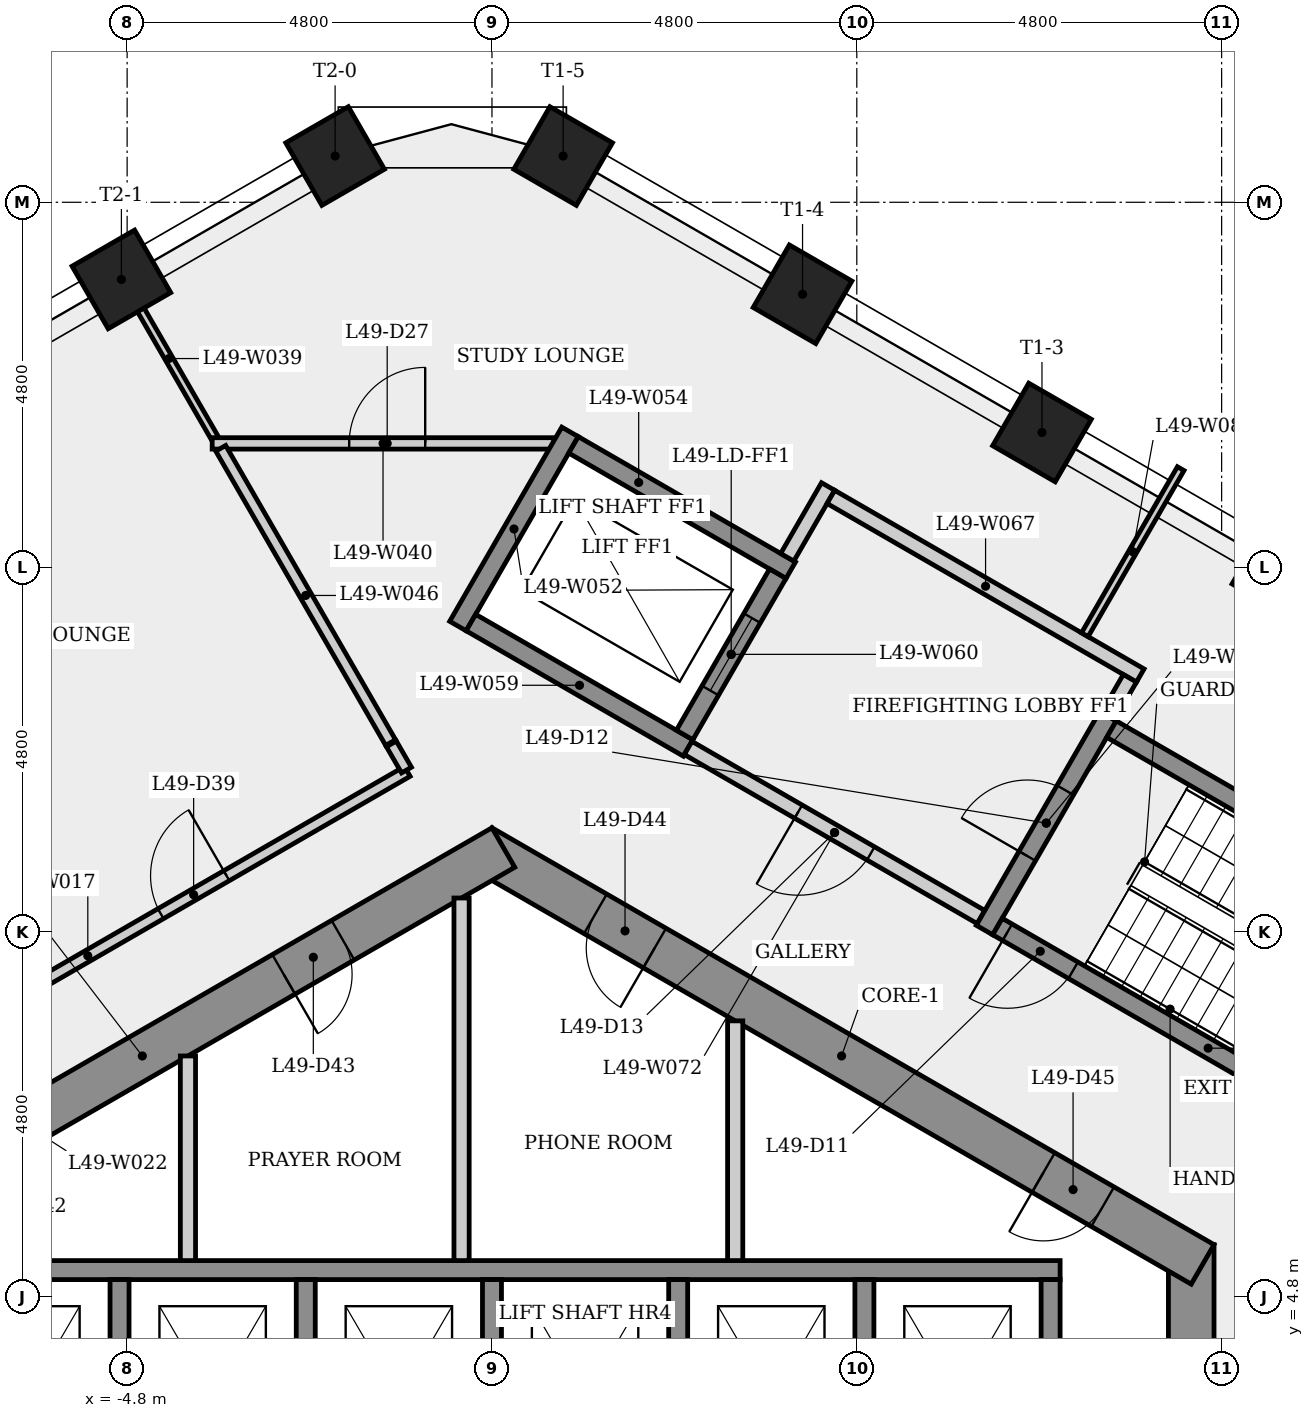
"""IFC4 building model, lengths in metres.
Left out: names, types, materials, properties, quantities, classifications, styles, units other than length and angle.
Written with IfcOpenShell. Run it as: python <this file> out.ifc"""

import sys

from ifc_helpers import new_model, si_unit, direction, frame, frame_2d, origin, origin_2d, place, context, subcontext, project, spatial, rectangle, extrude, element, fill, save


model = new_model("IFC4")
c1 = context("Model", 3, precision=1e-05, world=origin(), true_north=direction((0.0, 1.0)))
c2 = subcontext(c1, "Body", "Model", "MODEL_VIEW")
j1 = project(units=[si_unit("LENGTHUNIT", "METRE"), si_unit("PLANEANGLEUNIT", "RADIAN")], contexts=[c1])
p1 = place(None, origin())
s1 = spatial("IfcSite", under=j1, at=p1, CompositionType="ELEMENT")
p2 = place(p1, origin())
s2 = spatial("IfcBuilding", under=s1, at=p2, CompositionType="ELEMENT")
p3 = place(p2, frame((0.0, 0.0, 183.3)))
s3 = spatial("IfcBuildingStorey", under=s2, at=p3, CompositionType="ELEMENT", Elevation=183.3)
p4 = place(p3, frame((9.2, -5.485, 0.0), z_axis=(0.0, 0.0, 1.0), x_axis=(0.0, 1.0, 0.0)))
e1 = element("IfcWall", 1, at=p4, inside=s3, PredefinedType="SHEAR", context=c2, shape_type="SweptSolid", body=[
    extrude(rectangle(XDim=10.97, YDim=0.6, at=frame_2d((5.485, 0.0))), origin(), (0.0, 0.0, 1.0), 3.4),
])
p5 = place(p4, frame((4.685, 0.0, 0.0)))
e2 = element("IfcOpeningElement", 2, at=p5, cuts=e1, PredefinedType="OPENING", context=c2, shape_type="SweptSolid", body=[
    extrude(rectangle(XDim=1.6, YDim=2.1, at=frame_2d((0.8, 1.05))), frame((0.0, 0.31, 0.0), z_axis=(0.0, -1.0, 0.0), x_axis=(1.0, 0.0, 0.0)), (0.0, 0.0, 1.0), 0.62),
])
p6 = place(p3, frame((9.35, 5.225, 0.0), z_axis=(0.0, 0.0, 1.0), x_axis=(-0.866023993627, 0.500002442456, 0.0)))
e3 = element("IfcWall", 3, at=p6, inside=s3, PredefinedType="SHEAR", context=c2, shape_type="SweptSolid", body=[
    extrude(rectangle(XDim=10.97, YDim=0.6, at=frame_2d((5.485, 0.0))), origin(), (0.0, 0.0, 1.0), 3.4),
])
p7 = place(p6, frame((8.325, 0.0, 0.0)))
e4 = element("IfcOpeningElement", 4, at=p7, cuts=e3, PredefinedType="OPENING", context=c2, shape_type="SweptSolid", body=[
    extrude(rectangle(XDim=0.9, YDim=2.1, at=frame_2d((0.45, 1.05))), frame((0.0, 0.31, 0.0), z_axis=(0.0, -1.0, 0.0), x_axis=(1.0, 0.0, 0.0)), (0.0, 0.0, 1.0), 0.62),
])
p8 = place(p6, frame((1.518, 0.0, 0.0)))
e5 = element("IfcOpeningElement", 5, at=p8, cuts=e3, PredefinedType="OPENING", context=c2, shape_type="SweptSolid", body=[
    extrude(rectangle(XDim=0.9, YDim=2.1, at=frame_2d((0.45, 1.05))), frame((0.0, 0.31, 0.0), z_axis=(0.0, -1.0, 0.0), x_axis=(1.0, 0.0, 0.0)), (0.0, 0.0, 1.0), 0.62),
])
p9 = place(p3, frame((0.15, 10.71, 0.0), z_axis=(0.0, 0.0, 1.0), x_axis=(-0.866023993627, -0.500002442456, 0.0)))
e6 = element("IfcWall", 6, at=p9, inside=s3, PredefinedType="SHEAR", context=c2, shape_type="SweptSolid", body=[
    extrude(rectangle(XDim=10.97, YDim=0.6, at=frame_2d((5.485, 0.0))), origin(), (0.0, 0.0, 1.0), 3.4),
])
p10 = place(p9, frame((9.013, 0.0, 0.0)))
e7 = element("IfcOpeningElement", 7, at=p10, cuts=e6, PredefinedType="OPENING", context=c2, shape_type="SweptSolid", body=[
    extrude(rectangle(XDim=0.9, YDim=2.1, at=frame_2d((0.45, 1.05))), frame((0.0, 0.31, 0.0), z_axis=(0.0, -1.0, 0.0), x_axis=(1.0, 0.0, 0.0)), (0.0, 0.0, 1.0), 0.62),
])
p11 = place(p9, frame((2.437, 0.0, 0.0)))
e8 = element("IfcOpeningElement", 8, at=p11, cuts=e6, PredefinedType="OPENING", context=c2, shape_type="SweptSolid", body=[
    extrude(rectangle(XDim=0.9, YDim=2.1, at=frame_2d((0.45, 1.05))), frame((0.0, 0.31, 0.0), z_axis=(0.0, -1.0, 0.0), x_axis=(1.0, 0.0, 0.0)), (0.0, 0.0, 1.0), 0.62),
])
for number, where, z_axis, x_axis in (
    (9, (10.386, 14.352, 0.0), (0.0, 0.0, 1.0), (0.5, 0.866, 0.0)),
    (10, (7.236, 16.171, 0.0), (0.0, 0.0, 1.0), (0.5, 0.866, 0.0)),
    (11, (4.086, 17.99, 0.0), (0.0, 0.0, 1.0), (0.5, 0.866, 0.0)),
    (12, (0.936, 19.808, 0.0), (0.0, 0.0, 1.0), (0.5, 0.866, 0.0)),
    (13, (-2.064, 19.808, 0.0), (0.0, 0.0, 1.0), (-0.5, 0.866, 0.0)),
    (14, (-4.875, 18.185, 0.0), (0.0, 0.0, 1.0), (-0.5, 0.866, 0.0)),
):
    element("IfcColumn", number, at=place(p3, frame(where, z_axis=z_axis, x_axis=x_axis)), inside=s3, PredefinedType="COLUMN", context=c2, shape_type="SweptSolid", body=[
        extrude(rectangle(XDim=0.95, YDim=0.95, at=origin_2d()), origin(), (0.0, 0.0, 1.0), 3.4),
    ])
p12 = place(p3, frame((-9.521, 6.859, 0.0), z_axis=(0.0, 0.0, 1.0), x_axis=(0.866022649559, 0.500004770428, 0.0)))
e15 = element("IfcWall", 15, at=p12, inside=s3, PredefinedType="PARTITIONING", context=c2, shape_type="SweptSolid", body=[
    extrude(rectangle(XDim=9.707, YDim=0.15, at=frame_2d((4.853, 0.0))), origin(), (0.0, 0.0, 1.0), 3.0),
])
p13 = place(p12, frame((5.961, 0.0, 0.0)))
e16 = element("IfcOpeningElement", 16, at=p13, cuts=e15, PredefinedType="OPENING", context=c2, shape_type="SweptSolid", body=[
    extrude(rectangle(XDim=1.0, YDim=2.1, at=frame_2d((0.5, 1.05))), frame((0.0, 0.085, 0.0), z_axis=(0.0, -1.0, 0.0), x_axis=(1.0, 0.0, 0.0)), (0.0, 0.0, 1.0), 0.17),
])
p14 = place(p3, frame((-7.225, 5.15, 0.0), z_axis=(0.0, 0.0, 1.0), x_axis=(1.0, 0.0, 0.0)))
e17 = element("IfcWall", 17, at=p14, inside=s3, PredefinedType="SHEAR", context=c2, shape_type="SweptSolid", body=[
    extrude(rectangle(XDim=14.7, YDim=0.25, at=frame_2d((7.35, 0.0))), origin(), (0.0, 0.0, 1.0), 3.0),
])
p15 = place(p3, frame((-4.9, 5.025, 0.0), z_axis=(0.0, 0.0, 1.0), x_axis=(0.0, -1.0, 0.0)))
e18 = element("IfcWall", 18, at=p15, inside=s3, PredefinedType="SHEAR", context=c2, shape_type="SweptSolid", body=[
    extrude(rectangle(XDim=3.1, YDim=0.25, at=frame_2d((1.55, 0.0))), origin(), (0.0, 0.0, 1.0), 3.4),
])
p16 = place(p3, frame((-4.0, 7.967, 0.0), z_axis=(0.0, 0.0, 1.0), x_axis=(0.0, -1.0, 0.0)))
e19 = element("IfcWall", 19, at=p16, inside=s3, PredefinedType="PARTITIONING", context=c2, shape_type="SweptSolid", body=[
    extrude(rectangle(XDim=2.692, YDim=0.2, at=frame_2d((1.346, 0.0))), origin(), (0.0, 0.0, 1.0), 3.0),
])
p17 = place(p3, frame((-3.644, 16.093, 0.0), z_axis=(0.0, 0.0, 1.0), x_axis=(-0.500021275498, 0.866013120021, 0.0)))
e20 = element("IfcWall", 20, at=p17, inside=s3, PredefinedType="PARTITIONING", context=c2, shape_type="SweptSolid", body=[
    extrude(rectangle(XDim=2.428, YDim=0.1, at=frame_2d((1.214, 0.0))), origin(), (0.0, 0.0, 1.0), 3.0),
])
p18 = place(p3, frame((-3.681, 16.028, 0.0), z_axis=(0.0, 0.0, 1.0), x_axis=(1.0, 0.0, 0.0)))
e21 = element("IfcWall", 21, at=p18, inside=s3, PredefinedType="PARTITIONING", context=c2, shape_type="SweptSolid", body=[
    extrude(rectangle(XDim=4.496, YDim=0.15, at=frame_2d((2.248, 0.0))), origin(), (0.0, 0.0, 1.0), 3.0),
])
p19 = place(p18, frame((1.803, 0.0, 0.0)))
e22 = element("IfcOpeningElement", 22, at=p19, cuts=e21, PredefinedType="OPENING", context=c2, shape_type="SweptSolid", body=[
    extrude(rectangle(XDim=1.0, YDim=2.1, at=frame_2d((0.5, 1.05))), frame((0.0, 0.085, 0.0), z_axis=(0.0, -1.0, 0.0), x_axis=(1.0, 0.0, 0.0)), (0.0, 0.0, 1.0), 0.17),
])
p20 = place(p3, frame((-2.45, 5.025, 0.0), z_axis=(0.0, 0.0, 1.0), x_axis=(0.0, -1.0, 0.0)))
e23 = element("IfcWall", 23, at=p20, inside=s3, PredefinedType="SHEAR", context=c2, shape_type="SweptSolid", body=[
    extrude(rectangle(XDim=3.1, YDim=0.25, at=frame_2d((1.55, 0.0))), origin(), (0.0, 0.0, 1.0), 3.4),
])
p21 = place(p3, frame((-1.333, 12.091, 0.0), z_axis=(0.0, 0.0, 1.0), x_axis=(-0.499991893987, 0.866030083742, 0.0)))
e24 = element("IfcWall", 24, at=p21, inside=s3, PredefinedType="PARTITIONING", context=c2, shape_type="SweptSolid", body=[
    extrude(rectangle(XDim=4.471, YDim=0.15, at=frame_2d((2.235, 0.0))), origin(), (0.0, 0.0, 1.0), 3.0),
])
p22 = place(p3, frame((-1.323, 12.073, 0.0), z_axis=(0.0, 0.0, 1.0), x_axis=(0.4999705729, -0.866042392862, 0.0)))
e25 = element("IfcWall", 25, at=p22, inside=s3, PredefinedType="PARTITIONING", context=c2, shape_type="SweptSolid", body=[
    extrude(rectangle(XDim=0.397, YDim=0.15, at=frame_2d((0.199, 0.0))), origin(), (0.0, 0.0, 1.0), 3.0),
])
p23 = place(p3, frame((-0.4, 10.046, 0.0), z_axis=(0.0, 0.0, 1.0), x_axis=(0.0, -1.0, 0.0)))
e26 = element("IfcWall", 26, at=p23, inside=s3, PredefinedType="PARTITIONING", context=c2, shape_type="SweptSolid", body=[
    extrude(rectangle(XDim=4.771, YDim=0.2, at=frame_2d((2.385, 0.0))), origin(), (0.0, 0.0, 1.0), 3.0),
])
p24 = place(p3, frame((-0.448, 13.624, 0.0), z_axis=(0.0, 0.0, 1.0), x_axis=(0.500037662692, 0.866003658127, 0.0)))
e27 = element("IfcWall", 27, at=p24, inside=s3, PredefinedType="SHEAR", context=c2, shape_type="SweptSolid", body=[
    extrude(rectangle(XDim=2.95, YDim=0.25, at=frame_2d((1.475, 0.0))), origin(), (0.0, 0.0, 1.0), 3.0),
])
p25 = place(p3, frame((0.0, 5.025, 0.0), z_axis=(0.0, 0.0, 1.0), x_axis=(0.0, -1.0, 0.0)))
e28 = element("IfcWall", 28, at=p25, inside=s3, PredefinedType="SHEAR", context=c2, shape_type="SweptSolid", body=[
    extrude(rectangle(XDim=3.1, YDim=0.25, at=frame_2d((1.55, 0.0))), origin(), (0.0, 0.0, 1.0), 3.4),
])
p26 = place(p3, frame((1.073, 16.008, 0.0), z_axis=(0.0, 0.0, 1.0), x_axis=(0.866040211805, -0.499974350878, 0.0)))
e29 = element("IfcWall", 29, at=p26, inside=s3, PredefinedType="SHEAR", context=c2, shape_type="SweptSolid", body=[
    extrude(rectangle(XDim=3.3, YDim=0.25, at=frame_2d((1.65, 0.0))), origin(), (0.0, 0.0, 1.0), 3.0),
])
p27 = place(p3, frame((2.45, 5.025, 0.0), z_axis=(0.0, 0.0, 1.0), x_axis=(0.0, -1.0, 0.0)))
e30 = element("IfcWall", 30, at=p27, inside=s3, PredefinedType="SHEAR", context=c2, shape_type="SweptSolid", body=[
    extrude(rectangle(XDim=3.1, YDim=0.25, at=frame_2d((1.55, 0.0))), origin(), (0.0, 0.0, 1.0), 3.4),
])
p28 = place(p3, frame((2.581, 12.02, 0.0), z_axis=(0.0, 0.0, 1.0), x_axis=(-0.866040211805, 0.499974350878, 0.0)))
e31 = element("IfcWall", 31, at=p28, inside=s3, PredefinedType="SHEAR", context=c2, shape_type="SweptSolid", body=[
    extrude(rectangle(XDim=3.3, YDim=0.25, at=frame_2d((1.65, 0.0))), origin(), (0.0, 0.0, 1.0), 3.0),
])
p29 = place(p3, frame((2.535, 12.191, 0.0), z_axis=(0.0, 0.0, 1.0), x_axis=(0.500061746146, 0.865989751695, 0.0)))
e32 = element("IfcWall", 32, at=p29, inside=s3, PredefinedType="SHEAR", context=c2, shape_type="SweptSolid", body=[
    extrude(rectangle(XDim=2.45, YDim=0.25, at=frame_2d((1.225, 0.0))), origin(), (0.0, 0.0, 1.0), 3.4),
])
p30 = place(p29, frame((0.675, 0.0, 0.0)))
e33 = element("IfcOpeningElement", 33, at=p30, cuts=e32, PredefinedType="OPENING", context=c2, shape_type="SweptSolid", body=[
    extrude(rectangle(XDim=1.1, YDim=2.1, at=frame_2d((0.55, 1.05))), frame((0.0, 0.135, 0.0), z_axis=(0.0, -1.0, 0.0), x_axis=(1.0, 0.0, 0.0)), (0.0, 0.0, 1.0), 0.27),
])
p31 = place(p3, frame((3.2, 8.429, 0.0), z_axis=(0.0, 0.0, 1.0), x_axis=(0.0, -1.0, 0.0)))
e34 = element("IfcWall", 34, at=p31, inside=s3, PredefinedType="PARTITIONING", context=c2, shape_type="SweptSolid", body=[
    extrude(rectangle(XDim=3.154, YDim=0.2, at=frame_2d((1.577, 0.0))), origin(), (0.0, 0.0, 1.0), 3.0),
])
p32 = place(p3, frame((3.885, 14.529, 0.0), z_axis=(0.0, 0.0, 1.0), x_axis=(0.499997628298, 0.866026773083, 0.0)))
e35 = element("IfcWall", 35, at=p32, inside=s3, PredefinedType="PARTITIONING", context=c2, shape_type="SweptSolid", body=[
    extrude(rectangle(XDim=1.075, YDim=0.2, at=frame_2d((0.538, 0.0))), origin(), (0.0, 0.0, 1.0), 3.0),
])
p33 = place(p3, frame((4.459, 15.323, 0.0), z_axis=(0.0, 0.0, 1.0), x_axis=(0.866016039709, -0.500016218704, 0.0)))
e36 = element("IfcWall", 36, at=p33, inside=s3, PredefinedType="PARTITIONING", context=c2, shape_type="SweptSolid", body=[
    extrude(rectangle(XDim=4.7, YDim=0.2, at=frame_2d((2.35, 0.0))), origin(), (0.0, 0.0, 1.0), 3.0),
])
p34 = place(p3, frame((4.9, 5.025, 0.0), z_axis=(0.0, 0.0, 1.0), x_axis=(0.0, -1.0, 0.0)))
e37 = element("IfcWall", 37, at=p34, inside=s3, PredefinedType="SHEAR", context=c2, shape_type="SweptSolid", body=[
    extrude(rectangle(XDim=3.1, YDim=0.25, at=frame_2d((1.55, 0.0))), origin(), (0.0, 0.0, 1.0), 3.4),
])
p35 = place(p3, frame((6.435, 9.795, 0.0), z_axis=(0.0, 0.0, 1.0), x_axis=(-0.866012907634, 0.500021643343, 0.0)))
e38 = element("IfcWall", 38, at=p35, inside=s3, PredefinedType="PARTITIONING", context=c2, shape_type="SweptSolid", body=[
    extrude(rectangle(XDim=4.45, YDim=0.2, at=frame_2d((2.225, 0.0))), origin(), (0.0, 0.0, 1.0), 3.0),
])
p36 = place(p35, frame((1.675, 0.0, 0.0)))
e39 = element("IfcOpeningElement", 39, at=p36, cuts=e38, PredefinedType="OPENING", context=c2, shape_type="SweptSolid", body=[
    extrude(rectangle(XDim=1.1, YDim=2.1, at=frame_2d((0.55, 1.05))), frame((0.0, 0.11, 0.0), z_axis=(0.0, -1.0, 0.0), x_axis=(1.0, 0.0, 0.0)), (0.0, 0.0, 1.0), 0.22),
])
p37 = place(p3, frame((6.48, 9.624, 0.0), z_axis=(0.0, 0.0, 1.0), x_axis=(0.500017246033, 0.866015446554, 0.0)))
e40 = element("IfcWall", 40, at=p37, inside=s3, PredefinedType="SHEAR", context=c2, shape_type="SweptSolid", body=[
    extrude(rectangle(XDim=3.25, YDim=0.25, at=frame_2d((1.625, 0.0))), origin(), (0.0, 0.0, 1.0), 3.0),
])
p38 = place(p37, frame((1.125, 0.0, 0.0)))
e41 = element("IfcOpeningElement", 41, at=p38, cuts=e40, PredefinedType="OPENING", context=c2, shape_type="SweptSolid", body=[
    extrude(rectangle(XDim=1.0, YDim=2.1, at=frame_2d((0.5, 1.05))), frame((0.0, 0.135, 0.0), z_axis=(0.0, -1.0, 0.0), x_axis=(1.0, 0.0, 0.0)), (0.0, 0.0, 1.0), 0.27),
])
p39 = place(p3, frame((7.35, 5.025, 0.0), z_axis=(0.0, 0.0, 1.0), x_axis=(0.0, -1.0, 0.0)))
e42 = element("IfcWall", 42, at=p39, inside=s3, PredefinedType="SHEAR", context=c2, shape_type="SweptSolid", body=[
    extrude(rectangle(XDim=3.1, YDim=0.25, at=frame_2d((1.55, 0.0))), origin(), (0.0, 0.0, 1.0), 3.4),
])
p40 = place(p3, frame((7.8, 13.51, 0.0), z_axis=(0.0, 0.0, 1.0), x_axis=(0.50000999488, 0.866019633161, 0.0)))
e43 = element("IfcWall", 43, at=p40, inside=s3, PredefinedType="PARTITIONING", context=c2, shape_type="SweptSolid", body=[
    extrude(rectangle(XDim=2.523, YDim=0.1, at=frame_2d((1.262, 0.0))), origin(), (0.0, 0.0, 1.0), 3.0),
])
p41 = place(p3, frame((8.151, 12.268, 0.0), z_axis=(0.0, 0.0, 1.0), x_axis=(0.866025499775, -0.499999833739, 0.0)))
e44 = element("IfcWall", 44, at=p41, inside=s3, PredefinedType="SHEAR", context=c2, shape_type="SweptSolid", body=[
    extrude(rectangle(XDim=6.4, YDim=0.25, at=frame_2d((3.2, 0.0))), origin(), (0.0, 0.0, 1.0), 3.0),
])
p42 = place(p3, frame((8.393, 12.937, 0.0), z_axis=(0.0, 0.0, 1.0), x_axis=(-0.500065409566, -0.86598763626, 0.0)))
e45 = element("IfcWall", 45, at=p42, inside=s3, PredefinedType="PARTITIONING", context=c2, shape_type="SweptSolid", body=[
    extrude(rectangle(XDim=0.575, YDim=0.2, at=frame_2d((0.288, 0.0))), origin(), (0.0, 0.0, 1.0), 3.0),
])
p43 = place(p3, frame((12.194, 6.47, 0.0), z_axis=(0.0, 0.0, 1.0), x_axis=(-0.866025499775, 0.499999833739, 0.0)))
e46 = element("IfcWall", 46, at=p43, inside=s3, PredefinedType="SHEAR", context=c2, shape_type="SweptSolid", body=[
    extrude(rectangle(XDim=6.4, YDim=0.25, at=frame_2d((3.2, 0.0))), origin(), (0.0, 0.0, 1.0), 3.0),
])
p44 = place(p43, frame((5.25, 0.0, 0.0)))
e47 = element("IfcOpeningElement", 47, at=p44, cuts=e46, PredefinedType="OPENING", context=c2, shape_type="SweptSolid", body=[
    extrude(rectangle(XDim=1.0, YDim=2.1, at=frame_2d((0.5, 1.05))), frame((0.0, 0.135, 0.0), z_axis=(0.0, -1.0, 0.0), x_axis=(1.0, 0.0, 0.0)), (0.0, 0.0, 1.0), 0.27),
])
p45 = place(p44, origin())
e48 = element("IfcDoor", 48, at=p45, inside=s3, OperationType="SINGLE_SWING_RIGHT", PredefinedType="DOOR", context=c2, shape_type="SweptSolid", body=[
    extrude(rectangle(XDim=1.0, YDim=2.1, at=frame_2d((0.5, 1.05))), frame((0.0, 0.025, 0.0), z_axis=(0.0, -1.0, 0.0), x_axis=(1.0, 0.0, 0.0)), (0.0, 0.0, 1.0), 0.05),
])
fill(e47, e48)
p46 = place(p38, origin())
e49 = element("IfcDoor", 49, at=p46, inside=s3, OperationType="SINGLE_SWING_LEFT", PredefinedType="DOOR", context=c2, shape_type="SweptSolid", body=[
    extrude(rectangle(XDim=1.0, YDim=2.1, at=frame_2d((0.5, 1.05))), frame((0.0, 0.025, 0.0), z_axis=(0.0, -1.0, 0.0), x_axis=(1.0, 0.0, 0.0)), (0.0, 0.0, 1.0), 0.05),
])
fill(e41, e49)
p47 = place(p36, origin())
e50 = element("IfcDoor", 50, at=p47, inside=s3, OperationType="SINGLE_SWING_RIGHT", PredefinedType="DOOR", context=c2, shape_type="SweptSolid", body=[
    extrude(rectangle(XDim=1.1, YDim=2.1, at=frame_2d((0.55, 1.05))), frame((0.0, 0.025, 0.0), z_axis=(0.0, -1.0, 0.0), x_axis=(1.0, 0.0, 0.0)), (0.0, 0.0, 1.0), 0.05),
])
fill(e39, e50)
p48 = place(p30, origin())
e51 = element("IfcDoor", 51, at=p48, inside=s3, OperationType="SLIDING_TO_LEFT", PredefinedType="DOOR", context=c2, shape_type="SweptSolid", body=[
    extrude(rectangle(XDim=1.1, YDim=2.1, at=frame_2d((0.55, 1.05))), frame((0.0, 0.025, 0.0), z_axis=(0.0, -1.0, 0.0), x_axis=(1.0, 0.0, 0.0)), (0.0, 0.0, 1.0), 0.05),
])
fill(e33, e51)
p49 = place(p19, origin())
e52 = element("IfcDoor", 52, at=p49, inside=s3, OperationType="SINGLE_SWING_RIGHT", PredefinedType="DOOR", context=c2, shape_type="SweptSolid", body=[
    extrude(rectangle(XDim=1.0, YDim=2.1, at=frame_2d((0.5, 1.05))), frame((0.0, 0.025, 0.0), z_axis=(0.0, -1.0, 0.0), x_axis=(1.0, 0.0, 0.0)), (0.0, 0.0, 1.0), 0.05),
])
fill(e22, e52)
p50 = place(p13, origin())
e53 = element("IfcDoor", 53, at=p50, inside=s3, OperationType="SINGLE_SWING_RIGHT", PredefinedType="DOOR", context=c2, shape_type="SweptSolid", body=[
    extrude(rectangle(XDim=1.0, YDim=2.1, at=frame_2d((0.5, 1.05))), frame((0.0, 0.025, 0.0), z_axis=(0.0, -1.0, 0.0), x_axis=(1.0, 0.0, 0.0)), (0.0, 0.0, 1.0), 0.05),
])
fill(e16, e53)
p51 = place(p11, origin())
e54 = element("IfcDoor", 54, at=p51, inside=s3, OperationType="SINGLE_SWING_RIGHT", PredefinedType="DOOR", context=c2, shape_type="SweptSolid", body=[
    extrude(rectangle(XDim=0.9, YDim=2.1, at=frame_2d((0.45, 1.05))), frame((0.0, 0.025, 0.0), z_axis=(0.0, -1.0, 0.0), x_axis=(1.0, 0.0, 0.0)), (0.0, 0.0, 1.0), 0.05),
])
fill(e8, e54)
p52 = place(p7, origin())
e55 = element("IfcDoor", 55, at=p52, inside=s3, OperationType="SINGLE_SWING_LEFT", PredefinedType="DOOR", context=c2, shape_type="SweptSolid", body=[
    extrude(rectangle(XDim=0.9, YDim=2.1, at=frame_2d((0.45, 1.05))), frame((0.0, 0.025, 0.0), z_axis=(0.0, -1.0, 0.0), x_axis=(1.0, 0.0, 0.0)), (0.0, 0.0, 1.0), 0.05),
])
fill(e4, e55)
p53 = place(p8, origin())
e56 = element("IfcDoor", 56, at=p53, inside=s3, OperationType="SINGLE_SWING_RIGHT", PredefinedType="DOOR", context=c2, shape_type="SweptSolid", body=[
    extrude(rectangle(XDim=0.9, YDim=2.1, at=frame_2d((0.45, 1.05))), frame((0.0, 0.025, 0.0), z_axis=(0.0, -1.0, 0.0), x_axis=(1.0, 0.0, 0.0)), (0.0, 0.0, 1.0), 0.05),
])
fill(e5, e56)
save(model, sys.argv[1])
